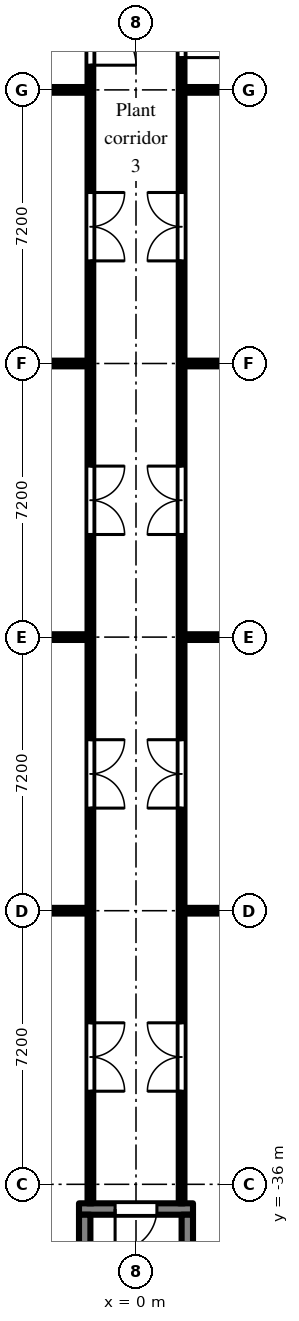
"""IFC4 building model, lengths in metres.
Left out: names, types, materials, properties, quantities, classifications, styles, units other than length and angle.
Written with IfcOpenShell. Run it as: python <this file> out.ifc"""

import sys

from ifc_helpers import new_model, si_unit, direction, frame, frame_2d, origin, place, context, subcontext, project, spatial, polyline, rectangle, outline, extrude, element, fill, save


model = new_model("IFC4")
c1 = context("Model", 3, precision=1e-05, world=origin(), true_north=direction((0.0, 1.0)))
c2 = subcontext(c1, "Body", "Model", "MODEL_VIEW")
j1 = project(units=[si_unit("LENGTHUNIT", "METRE"), si_unit("PLANEANGLEUNIT", "RADIAN")], contexts=[c1])
p1 = place(None, origin())
s1 = spatial("IfcSite", under=j1, at=p1, CompositionType="ELEMENT")
p2 = place(p1, origin())
s2 = spatial("IfcBuilding", under=s1, at=p2, CompositionType="ELEMENT")
p3 = place(p2, frame((0.0, 0.0, 111.9)))
s3 = spatial("IfcBuildingStorey", under=s2, at=p3, CompositionType="ELEMENT", Elevation=111.9)
p4 = place(p3, frame((-1.5, -36.65, 0.0), z_axis=(0.0, 0.0, 1.0), x_axis=(1.0, 0.0, 0.0)))
e1 = element("IfcWall", 1, at=p4, inside=s3, PredefinedType="SHEAR", context=c2, shape_type="SweptSolid", body=[
    extrude(rectangle(XDim=3.0, YDim=0.3, at=frame_2d((1.5, 0.0))), origin(), (0.0, 0.0, 1.0), 3.8),
])
p5 = place(p4, frame((0.95, 0.0, 0.0)))
e2 = element("IfcOpeningElement", 2, at=p5, cuts=e1, PredefinedType="OPENING", context=c2, shape_type="SweptSolid", body=[
    extrude(rectangle(XDim=1.1, YDim=2.1, at=frame_2d((0.55, 1.05))), frame((0.0, 0.16, 0.0), z_axis=(0.0, -1.0, 0.0), x_axis=(1.0, 0.0, 0.0)), (0.0, 0.0, 1.0), 0.32),
])
for number, where, z_axis, x_axis in (
    (3, (-1.35, -36.8, 0.0), (0.0, 0.0, 1.0), (0.0, -1.0, 0.0)),
    (4, (1.35, -36.8, 0.0), (0.0, 0.0, 1.0), (0.0, -1.0, 0.0)),
):
    element("IfcWall", number, at=place(p3, frame(where, z_axis=z_axis, x_axis=x_axis)), inside=s3, PredefinedType="SHEAR", context=c2, shape_type="SweptSolid", body=[
        extrude(rectangle(XDim=5.8, YDim=0.3, at=frame_2d((2.9, 0.0))), origin(), (0.0, 0.0, 1.0), 3.8),
    ])
p6 = place(p3, frame((-6.9, -28.8, 0.0), z_axis=(0.0, 0.0, 1.0), x_axis=(1.0, 0.0, 0.0)))
e5 = element("IfcWall", 5, at=p6, inside=s3, PredefinedType="PARTITIONING", context=c2, shape_type="SweptSolid", body=[
    extrude(rectangle(XDim=5.625, YDim=0.15, at=frame_2d((2.812, 0.0))), origin(), (0.0, 0.0, 1.0), 3.8),
])
p7 = place(p3, frame((-6.9, -21.6, 0.0), z_axis=(0.0, 0.0, 1.0), x_axis=(1.0, 0.0, 0.0)))
e6 = element("IfcWall", 6, at=p7, inside=s3, PredefinedType="PARTITIONING", context=c2, shape_type="SweptSolid", body=[
    extrude(rectangle(XDim=5.625, YDim=0.15, at=frame_2d((2.812, 0.0))), origin(), (0.0, 0.0, 1.0), 2.2),
])
p8 = place(p3, frame((-1.2, -36.5, 0.0), z_axis=(0.0, 0.0, 1.0), x_axis=(0.0, 1.0, 0.0)))
e7 = element("IfcWall", 7, at=p8, inside=s3, PredefinedType="PARTITIONING", context=c2, shape_type="SweptSolid", body=[
    extrude(outline(polyline([(0.0, 0.0), (35.375, 0.0), (35.375, 3.8), (13.302, 3.8), (13.3, 3.4), (12.5, 3.4), (12.498, 3.8), (0.0, 3.8), (0.0, 0.0)])), frame((0.0, 0.075, 0.0), z_axis=(0.0, -1.0, 0.0), x_axis=(1.0, 0.0, 0.0)), (0.0, 0.0, 1.0), 0.15),
])
p9 = place(p8, frame((29.95, 0.0, 0.0)))
e8 = element("IfcOpeningElement", 8, at=p9, cuts=e7, PredefinedType="OPENING", context=c2, shape_type="SweptSolid", body=[
    extrude(rectangle(XDim=1.2, YDim=2.1, at=frame_2d((0.6, 1.05))), frame((0.0, 0.085, 0.0), z_axis=(0.0, -1.0, 0.0), x_axis=(1.0, 0.0, 0.0)), (0.0, 0.0, 1.0), 0.17),
])
p10 = place(p8, frame((34.3, 0.0, 0.0)))
e9 = element("IfcOpeningElement", 9, at=p10, cuts=e7, PredefinedType="OPENING", context=c2, shape_type="SweptSolid", body=[
    extrude(rectangle(XDim=0.9, YDim=2.1, at=frame_2d((0.45, 1.05))), frame((0.0, 0.085, 0.0), z_axis=(0.0, -1.0, 0.0), x_axis=(1.0, 0.0, 0.0)), (0.0, 0.0, 1.0), 0.17),
])
p11 = place(p8, frame((24.8, 0.0, 0.0)))
e10 = element("IfcOpeningElement", 10, at=p11, cuts=e7, PredefinedType="OPENING", context=c2, shape_type="SweptSolid", body=[
    extrude(rectangle(XDim=1.8, YDim=2.1, at=frame_2d((0.9, 1.05))), frame((0.0, 0.085, 0.0), z_axis=(0.0, -1.0, 0.0), x_axis=(1.0, 0.0, 0.0)), (0.0, 0.0, 1.0), 0.17),
])
p12 = place(p8, frame((17.6, 0.0, 0.0)))
e11 = element("IfcOpeningElement", 11, at=p12, cuts=e7, PredefinedType="OPENING", context=c2, shape_type="SweptSolid", body=[
    extrude(rectangle(XDim=1.8, YDim=2.1, at=frame_2d((0.9, 1.05))), frame((0.0, 0.085, 0.0), z_axis=(0.0, -1.0, 0.0), x_axis=(1.0, 0.0, 0.0)), (0.0, 0.0, 1.0), 0.17),
])
p13 = place(p8, frame((10.4, 0.0, 0.0)))
e12 = element("IfcOpeningElement", 12, at=p13, cuts=e7, PredefinedType="OPENING", context=c2, shape_type="SweptSolid", body=[
    extrude(rectangle(XDim=1.8, YDim=2.1, at=frame_2d((0.9, 1.05))), frame((0.0, 0.085, 0.0), z_axis=(0.0, -1.0, 0.0), x_axis=(1.0, 0.0, 0.0)), (0.0, 0.0, 1.0), 0.17),
])
p14 = place(p8, frame((2.95, 0.0, 0.0)))
e13 = element("IfcOpeningElement", 13, at=p14, cuts=e7, PredefinedType="OPENING", context=c2, shape_type="SweptSolid", body=[
    extrude(rectangle(XDim=1.8, YDim=2.1, at=frame_2d((0.9, 1.05))), frame((0.0, 0.085, 0.0), z_axis=(0.0, -1.0, 0.0), x_axis=(1.0, 0.0, 0.0)), (0.0, 0.0, 1.0), 0.17),
])
p15 = place(p3, frame((1.2, -36.5, 0.0), z_axis=(0.0, 0.0, 1.0), x_axis=(0.0, 1.0, 0.0)))
e14 = element("IfcWall", 14, at=p15, inside=s3, PredefinedType="PARTITIONING", context=c2, shape_type="SweptSolid", body=[
    extrude(outline(polyline([(0.0, 0.0), (35.375, 0.0), (35.375, 3.8), (13.302, 3.8), (13.3, 3.4), (12.5, 3.4), (12.498, 3.8), (0.0, 3.8), (0.0, 0.0)])), frame((0.0, 0.075, 0.0), z_axis=(0.0, -1.0, 0.0), x_axis=(1.0, 0.0, 0.0)), (0.0, 0.0, 1.0), 0.15),
])
p16 = place(p15, frame((30.15, 0.0, 0.0)))
e15 = element("IfcOpeningElement", 15, at=p16, cuts=e14, PredefinedType="OPENING", context=c2, shape_type="SweptSolid", body=[
    extrude(rectangle(XDim=1.2, YDim=2.1, at=frame_2d((0.6, 1.05))), frame((0.0, 0.085, 0.0), z_axis=(0.0, -1.0, 0.0), x_axis=(1.0, 0.0, 0.0)), (0.0, 0.0, 1.0), 0.17),
])
p17 = place(p15, frame((24.8, 0.0, 0.0)))
e16 = element("IfcOpeningElement", 16, at=p17, cuts=e14, PredefinedType="OPENING", context=c2, shape_type="SweptSolid", body=[
    extrude(rectangle(XDim=1.8, YDim=2.1, at=frame_2d((0.9, 1.05))), frame((0.0, 0.085, 0.0), z_axis=(0.0, -1.0, 0.0), x_axis=(1.0, 0.0, 0.0)), (0.0, 0.0, 1.0), 0.17),
])
p18 = place(p15, frame((17.6, 0.0, 0.0)))
e17 = element("IfcOpeningElement", 17, at=p18, cuts=e14, PredefinedType="OPENING", context=c2, shape_type="SweptSolid", body=[
    extrude(rectangle(XDim=1.8, YDim=2.1, at=frame_2d((0.9, 1.05))), frame((0.0, 0.085, 0.0), z_axis=(0.0, -1.0, 0.0), x_axis=(1.0, 0.0, 0.0)), (0.0, 0.0, 1.0), 0.17),
])
p19 = place(p15, frame((10.4, 0.0, 0.0)))
e18 = element("IfcOpeningElement", 18, at=p19, cuts=e14, PredefinedType="OPENING", context=c2, shape_type="SweptSolid", body=[
    extrude(rectangle(XDim=1.8, YDim=2.1, at=frame_2d((0.9, 1.05))), frame((0.0, 0.085, 0.0), z_axis=(0.0, -1.0, 0.0), x_axis=(1.0, 0.0, 0.0)), (0.0, 0.0, 1.0), 0.17),
])
p20 = place(p15, frame((2.95, 0.0, 0.0)))
e19 = element("IfcOpeningElement", 19, at=p20, cuts=e14, PredefinedType="OPENING", context=c2, shape_type="SweptSolid", body=[
    extrude(rectangle(XDim=1.8, YDim=2.1, at=frame_2d((0.9, 1.05))), frame((0.0, 0.085, 0.0), z_axis=(0.0, -1.0, 0.0), x_axis=(1.0, 0.0, 0.0)), (0.0, 0.0, 1.0), 0.17),
])
p21 = place(p3, frame((1.275, -28.8, 0.0), z_axis=(0.0, 0.0, 1.0), x_axis=(1.0, 0.0, 0.0)))
e20 = element("IfcWall", 20, at=p21, inside=s3, PredefinedType="PARTITIONING", context=c2, shape_type="SweptSolid", body=[
    extrude(rectangle(XDim=5.625, YDim=0.15, at=frame_2d((2.812, 0.0))), origin(), (0.0, 0.0, 1.0), 3.8),
])
p22 = place(p3, frame((1.275, -21.6, 0.0), z_axis=(0.0, 0.0, 1.0), x_axis=(1.0, 0.0, 0.0)))
e21 = element("IfcWall", 21, at=p22, inside=s3, PredefinedType="PARTITIONING", context=c2, shape_type="SweptSolid", body=[
    extrude(rectangle(XDim=5.625, YDim=0.15, at=frame_2d((2.812, 0.0))), origin(), (0.0, 0.0, 1.0), 2.2),
])
for number, where, z_axis, x_axis in (
    (22, (1.275, -14.4, 0.0), (0.0, 0.0, 1.0), (1.0, 0.0, 0.0)),
    (23, (1.275, -7.2, 0.0), (0.0, 0.0, 1.0), (1.0, 0.0, 0.0)),
    (24, (-3.75, -14.4, 0.0), (0.0, 0.0, 1.0), (1.0, 0.0, 0.0)),
    (25, (-3.75, -7.2, 0.0), (0.0, 0.0, 1.0), (1.0, 0.0, 0.0)),
):
    element("IfcWall", number, at=place(p3, frame(where, z_axis=z_axis, x_axis=x_axis)), inside=s3, PredefinedType="PARTITIONING", context=c2, shape_type="SweptSolid", body=[
        extrude(rectangle(XDim=2.475, YDim=0.15, at=frame_2d((1.238, 0.0))), origin(), (0.0, 0.0, 1.0), 3.8),
    ])
p23 = place(p5, frame((1.1, 0.0, 0.0), z_axis=(0.0, 0.0, 1.0), x_axis=(-1.0, 0.0, 0.0)))
e26 = element("IfcDoor", 26, at=p23, inside=s3, OperationType="SINGLE_SWING_RIGHT", PredefinedType="DOOR", context=c2, shape_type="SweptSolid", body=[
    extrude(rectangle(XDim=1.1, YDim=2.1, at=frame_2d((0.55, 1.05))), frame((0.0, 0.025, 0.0), z_axis=(0.0, -1.0, 0.0), x_axis=(1.0, 0.0, 0.0)), (0.0, 0.0, 1.0), 0.05),
])
fill(e2, e26)
p24 = place(p9, frame((1.2, 0.0, 0.0), z_axis=(0.0, 0.0, 1.0), x_axis=(-1.0, 0.0, 0.0)))
e27 = element("IfcDoor", 27, at=p24, inside=s3, OperationType="SINGLE_SWING_RIGHT", PredefinedType="DOOR", context=c2, shape_type="SweptSolid", body=[
    extrude(rectangle(XDim=1.2, YDim=2.1, at=frame_2d((0.6, 1.05))), frame((0.0, 0.025, 0.0), z_axis=(0.0, -1.0, 0.0), x_axis=(1.0, 0.0, 0.0)), (0.0, 0.0, 1.0), 0.05),
])
fill(e8, e27)
p25 = place(p16, frame((1.2, 0.0, 0.0), z_axis=(0.0, 0.0, 1.0), x_axis=(-1.0, 0.0, 0.0)))
e28 = element("IfcDoor", 28, at=p25, inside=s3, OperationType="SINGLE_SWING_RIGHT", PredefinedType="DOOR", context=c2, shape_type="SweptSolid", body=[
    extrude(rectangle(XDim=1.2, YDim=2.1, at=frame_2d((0.6, 1.05))), frame((0.0, 0.025, 0.0), z_axis=(0.0, -1.0, 0.0), x_axis=(1.0, 0.0, 0.0)), (0.0, 0.0, 1.0), 0.05),
])
fill(e15, e28)
p26 = place(p17, origin())
e29 = element("IfcDoor", 29, at=p26, inside=s3, OperationType="DOUBLE_DOOR_DOUBLE_SWING", PredefinedType="DOOR", context=c2, shape_type="SweptSolid", body=[
    extrude(rectangle(XDim=1.8, YDim=2.1, at=frame_2d((0.9, 1.05))), frame((0.0, 0.025, 0.0), z_axis=(0.0, -1.0, 0.0), x_axis=(1.0, 0.0, 0.0)), (0.0, 0.0, 1.0), 0.05),
])
fill(e16, e29)
p27 = place(p18, origin())
e30 = element("IfcDoor", 30, at=p27, inside=s3, OperationType="DOUBLE_DOOR_DOUBLE_SWING", PredefinedType="DOOR", context=c2, shape_type="SweptSolid", body=[
    extrude(rectangle(XDim=1.8, YDim=2.1, at=frame_2d((0.9, 1.05))), frame((0.0, 0.025, 0.0), z_axis=(0.0, -1.0, 0.0), x_axis=(1.0, 0.0, 0.0)), (0.0, 0.0, 1.0), 0.05),
])
fill(e17, e30)
p28 = place(p19, origin())
e31 = element("IfcDoor", 31, at=p28, inside=s3, OperationType="DOUBLE_DOOR_DOUBLE_SWING", PredefinedType="DOOR", context=c2, shape_type="SweptSolid", body=[
    extrude(rectangle(XDim=1.8, YDim=2.1, at=frame_2d((0.9, 1.05))), frame((0.0, 0.025, 0.0), z_axis=(0.0, -1.0, 0.0), x_axis=(1.0, 0.0, 0.0)), (0.0, 0.0, 1.0), 0.05),
])
fill(e18, e31)
p29 = place(p20, origin())
e32 = element("IfcDoor", 32, at=p29, inside=s3, OperationType="DOUBLE_DOOR_DOUBLE_SWING", PredefinedType="DOOR", context=c2, shape_type="SweptSolid", body=[
    extrude(rectangle(XDim=1.8, YDim=2.1, at=frame_2d((0.9, 1.05))), frame((0.0, 0.025, 0.0), z_axis=(0.0, -1.0, 0.0), x_axis=(1.0, 0.0, 0.0)), (0.0, 0.0, 1.0), 0.05),
])
fill(e19, e32)
p30 = place(p11, frame((1.8, 0.0, 0.0), z_axis=(0.0, 0.0, 1.0), x_axis=(-1.0, 0.0, 0.0)))
e33 = element("IfcDoor", 33, at=p30, inside=s3, OperationType="DOUBLE_DOOR_DOUBLE_SWING", PredefinedType="DOOR", context=c2, shape_type="SweptSolid", body=[
    extrude(rectangle(XDim=1.8, YDim=2.1, at=frame_2d((0.9, 1.05))), frame((0.0, 0.025, 0.0), z_axis=(0.0, -1.0, 0.0), x_axis=(1.0, 0.0, 0.0)), (0.0, 0.0, 1.0), 0.05),
])
fill(e10, e33)
p31 = place(p12, frame((1.8, 0.0, 0.0), z_axis=(0.0, 0.0, 1.0), x_axis=(-1.0, 0.0, 0.0)))
e34 = element("IfcDoor", 34, at=p31, inside=s3, OperationType="DOUBLE_DOOR_DOUBLE_SWING", PredefinedType="DOOR", context=c2, shape_type="SweptSolid", body=[
    extrude(rectangle(XDim=1.8, YDim=2.1, at=frame_2d((0.9, 1.05))), frame((0.0, 0.025, 0.0), z_axis=(0.0, -1.0, 0.0), x_axis=(1.0, 0.0, 0.0)), (0.0, 0.0, 1.0), 0.05),
])
fill(e11, e34)
p32 = place(p13, frame((1.8, 0.0, 0.0), z_axis=(0.0, 0.0, 1.0), x_axis=(-1.0, 0.0, 0.0)))
e35 = element("IfcDoor", 35, at=p32, inside=s3, OperationType="DOUBLE_DOOR_DOUBLE_SWING", PredefinedType="DOOR", context=c2, shape_type="SweptSolid", body=[
    extrude(rectangle(XDim=1.8, YDim=2.1, at=frame_2d((0.9, 1.05))), frame((0.0, 0.025, 0.0), z_axis=(0.0, -1.0, 0.0), x_axis=(1.0, 0.0, 0.0)), (0.0, 0.0, 1.0), 0.05),
])
fill(e12, e35)
p33 = place(p14, frame((1.8, 0.0, 0.0), z_axis=(0.0, 0.0, 1.0), x_axis=(-1.0, 0.0, 0.0)))
e36 = element("IfcDoor", 36, at=p33, inside=s3, OperationType="DOUBLE_DOOR_DOUBLE_SWING", PredefinedType="DOOR", context=c2, shape_type="SweptSolid", body=[
    extrude(rectangle(XDim=1.8, YDim=2.1, at=frame_2d((0.9, 1.05))), frame((0.0, 0.025, 0.0), z_axis=(0.0, -1.0, 0.0), x_axis=(1.0, 0.0, 0.0)), (0.0, 0.0, 1.0), 0.05),
])
fill(e13, e36)
save(model, sys.argv[1])
